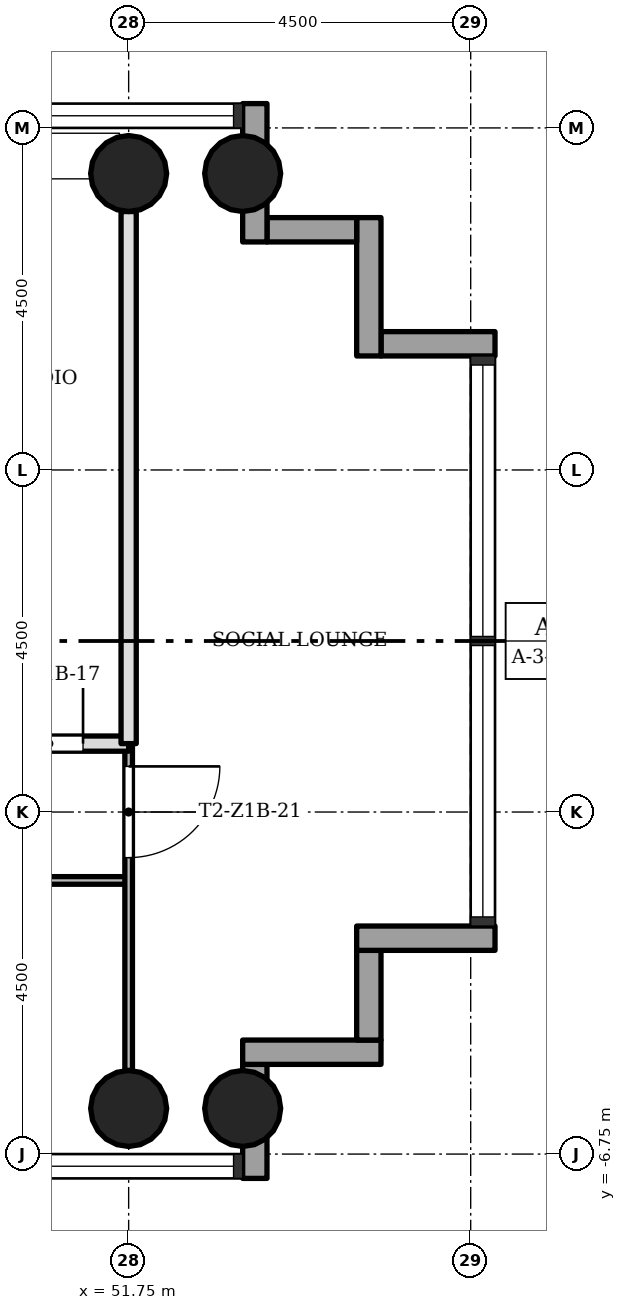
"""IFC4 building model, lengths in metres.
Left out: names, types, materials, properties, quantities, classifications, styles, units other than length and angle.
Written with IfcOpenShell. Run it as: python <this file> out.ifc"""

import sys

from ifc_helpers import new_model, si_unit, direction, frame, frame_2d, origin, origin_2d, place, context, subcontext, project, spatial, rectangle, hollow_circle, extrude, element, fill, save


model = new_model("IFC4")
c1 = context("Model", 3, precision=1e-05, world=origin(), true_north=direction((0.0, 1.0)))
c2 = subcontext(c1, "Body", "Model", "MODEL_VIEW")
j1 = project(units=[si_unit("LENGTHUNIT", "METRE"), si_unit("PLANEANGLEUNIT", "RADIAN")], contexts=[c1])
p1 = place(None, origin())
s1 = spatial("IfcSite", under=j1, at=p1, CompositionType="ELEMENT")
p2 = place(p1, origin())
s2 = spatial("IfcBuilding", under=s1, at=p2, CompositionType="ELEMENT")
p3 = place(p2, frame((0.0, 0.0, 34.7)))
s3 = spatial("IfcBuildingStorey", under=s2, at=p3, CompositionType="ELEMENT", Elevation=34.7)
for number, where, z_axis, x_axis in (
    (1, (51.75, -6.15, 0.0), (0.0, 0.0, 1.0), (1.0, 0.0, 0.0)),
    (2, (51.75, 6.15, 0.0), (0.0, 0.0, 1.0), (1.0, 0.0, 0.0)),
    (3, (53.25, -6.15, 0.0), (0.0, 0.0, 1.0), (1.0, 0.0, 0.0)),
    (4, (53.25, 6.15, 0.0), (0.0, 0.0, 1.0), (1.0, 0.0, 0.0)),
):
    element("IfcColumn", number, at=place(p3, frame(where, z_axis=z_axis, x_axis=x_axis)), inside=s3, PredefinedType="COLUMN", context=c2, shape_type="SweptSolid", body=[
        extrude(hollow_circle(Radius=0.5, WallThickness=0.036, at=origin_2d()), origin(), (0.0, 0.0, 1.0), 3.4),
    ])
p4 = place(p3, frame((53.41, -7.07, -0.3), z_axis=(0.0, 0.0, 1.0), x_axis=(0.0, 1.0, 0.0)))
e5 = element("IfcWall", 5, at=p4, inside=s3, PredefinedType="STANDARD", context=c2, shape_type="SweptSolid", body=[
    extrude(rectangle(XDim=1.5, YDim=0.32, at=frame_2d((0.75, 0.0))), origin(), (0.0, 0.0, 1.0), 3.4),
])
p5 = place(p3, frame((53.25, -5.41, -0.3), z_axis=(0.0, 0.0, 1.0), x_axis=(1.0, 0.0, 0.0)))
e6 = element("IfcWall", 6, at=p5, inside=s3, PredefinedType="STANDARD", context=c2, shape_type="SweptSolid", body=[
    extrude(rectangle(XDim=1.82, YDim=0.32, at=frame_2d((0.91, 0.0))), origin(), (0.0, 0.0, 1.0), 3.4),
])
p6 = place(p3, frame((54.91, -5.25, -0.3), z_axis=(0.0, 0.0, 1.0), x_axis=(0.0, 1.0, 0.0)))
e7 = element("IfcWall", 7, at=p6, inside=s3, PredefinedType="STANDARD", context=c2, shape_type="SweptSolid", body=[
    extrude(rectangle(XDim=1.18, YDim=0.32, at=frame_2d((0.59, 0.0))), origin(), (0.0, 0.0, 1.0), 3.4),
])
p7 = place(p3, frame((54.75, -3.91, -0.3), z_axis=(0.0, 0.0, 1.0), x_axis=(1.0, 0.0, 0.0)))
e8 = element("IfcWall", 8, at=p7, inside=s3, PredefinedType="STANDARD", context=c2, shape_type="SweptSolid", body=[
    extrude(rectangle(XDim=1.82, YDim=0.32, at=frame_2d((0.91, 0.0))), origin(), (0.0, 0.0, 1.0), 3.4),
])
p8 = place(p3, frame((56.57, 3.91, -0.3), z_axis=(0.0, 0.0, 1.0), x_axis=(-1.0, 0.0, 0.0)))
e9 = element("IfcWall", 9, at=p8, inside=s3, PredefinedType="STANDARD", context=c2, shape_type="SweptSolid", body=[
    extrude(rectangle(XDim=1.5, YDim=0.32, at=frame_2d((0.75, 0.0))), origin(), (0.0, 0.0, 1.0), 3.4),
])
p9 = place(p3, frame((54.91, 3.75, -0.3), z_axis=(0.0, 0.0, 1.0), x_axis=(0.0, 1.0, 0.0)))
e10 = element("IfcWall", 10, at=p9, inside=s3, PredefinedType="STANDARD", context=c2, shape_type="SweptSolid", body=[
    extrude(rectangle(XDim=1.82, YDim=0.32, at=frame_2d((0.91, 0.0))), origin(), (0.0, 0.0, 1.0), 3.4),
])
p10 = place(p3, frame((54.75, 5.41, -0.3), z_axis=(0.0, 0.0, 1.0), x_axis=(-1.0, 0.0, 0.0)))
e11 = element("IfcWall", 11, at=p10, inside=s3, PredefinedType="STANDARD", context=c2, shape_type="SweptSolid", body=[
    extrude(rectangle(XDim=1.18, YDim=0.32, at=frame_2d((0.59, 0.0))), origin(), (0.0, 0.0, 1.0), 3.4),
])
p11 = place(p3, frame((53.41, 5.25, -0.3), z_axis=(0.0, 0.0, 1.0), x_axis=(0.0, 1.0, 0.0)))
e12 = element("IfcWall", 12, at=p11, inside=s3, PredefinedType="STANDARD", context=c2, shape_type="SweptSolid", body=[
    extrude(rectangle(XDim=1.82, YDim=0.32, at=frame_2d((0.91, 0.0))), origin(), (0.0, 0.0, 1.0), 3.4),
])
p12 = place(p3, frame((51.75, -3.15, 0.0), z_axis=(0.0, 0.0, 1.0), x_axis=(-1.0, 0.0, 0.0)))
e13 = element("IfcWall", 13, at=p12, inside=s3, PredefinedType="PARTITIONING", context=c2, shape_type="SweptSolid", body=[
    extrude(rectangle(XDim=9.0, YDim=0.1, at=frame_2d((4.5, 0.0))), origin(), (0.0, 0.0, 1.0), 3.0),
])
p13 = place(p12, frame((6.3, 0.0, 0.0)))
e14 = element("IfcOpeningElement", 14, at=p13, cuts=e13, PredefinedType="OPENING", context=c2, shape_type="SweptSolid", body=[
    extrude(rectangle(XDim=0.9, YDim=2.1, at=frame_2d((0.45, 1.05))), frame((0.0, 0.06, 0.0), z_axis=(0.0, -1.0, 0.0), x_axis=(1.0, 0.0, 0.0)), (0.0, 0.0, 1.0), 0.12),
])
p14 = place(p12, frame((1.8, 0.0, 0.0)))
e15 = element("IfcOpeningElement", 15, at=p14, cuts=e13, PredefinedType="OPENING", context=c2, shape_type="SweptSolid", body=[
    extrude(rectangle(XDim=0.9, YDim=2.1, at=frame_2d((0.45, 1.05))), frame((0.0, 0.06, 0.0), z_axis=(0.0, -1.0, 0.0), x_axis=(1.0, 0.0, 0.0)), (0.0, 0.0, 1.0), 0.12),
])
p15 = place(p3, frame((51.75, -1.35, 0.0), z_axis=(0.0, 0.0, 1.0), x_axis=(-1.0, 0.0, 0.0)))
e16 = element("IfcWall", 16, at=p15, inside=s3, PredefinedType="SOLIDWALL", context=c2, shape_type="SweptSolid", body=[
    extrude(rectangle(XDim=4.5, YDim=0.2, at=frame_2d((2.25, 0.0))), origin(), (0.0, 0.0, 1.0), 3.0),
])
p16 = place(p15, frame((0.6, 0.0, 0.0)))
e17 = element("IfcOpeningElement", 17, at=p16, cuts=e16, PredefinedType="OPENING", context=c2, shape_type="SweptSolid", body=[
    extrude(rectangle(XDim=0.9, YDim=2.1, at=frame_2d((0.45, 1.05))), frame((0.0, 0.11, 0.0), z_axis=(0.0, -1.0, 0.0), x_axis=(1.0, 0.0, 0.0)), (0.0, 0.0, 1.0), 0.22),
])
p17 = place(p3, frame((51.75, -5.65, 0.0), z_axis=(0.0, 0.0, 1.0), x_axis=(0.0, 1.0, 0.0)))
e18 = element("IfcWall", 18, at=p17, inside=s3, PredefinedType="PARTITIONING", context=c2, shape_type="SweptSolid", body=[
    extrude(rectangle(XDim=4.3, YDim=0.1, at=frame_2d((2.15, 0.0))), origin(), (0.0, 0.0, 1.0), 3.0),
])
p18 = place(p17, frame((2.8, 0.0, 0.0)))
e19 = element("IfcOpeningElement", 19, at=p18, cuts=e18, PredefinedType="OPENING", context=c2, shape_type="SweptSolid", body=[
    extrude(rectangle(XDim=1.2, YDim=2.1, at=frame_2d((0.6, 1.05))), frame((0.0, 0.06, 0.0), z_axis=(0.0, -1.0, 0.0), x_axis=(1.0, 0.0, 0.0)), (0.0, 0.0, 1.0), 0.12),
])
p19 = place(p3, frame((51.75, -1.35, 0.0), z_axis=(0.0, 0.0, 1.0), x_axis=(0.0, 1.0, 0.0)))
e20 = element("IfcWall", 20, at=p19, inside=s3, PredefinedType="SOLIDWALL", context=c2, shape_type="SweptSolid", body=[
    extrude(rectangle(XDim=7.0, YDim=0.2, at=frame_2d((3.5, 0.0))), origin(), (0.0, 0.0, 1.0), 3.0),
])
p20 = place(p16, origin())
e21 = element("IfcDoor", 21, at=p20, inside=s3, OperationType="SINGLE_SWING_LEFT", PredefinedType="DOOR", context=c2, shape_type="SweptSolid", body=[
    extrude(rectangle(XDim=0.9, YDim=2.1, at=frame_2d((0.45, 1.05))), frame((0.0, 0.025, 0.0), z_axis=(0.0, -1.0, 0.0), x_axis=(1.0, 0.0, 0.0)), (0.0, 0.0, 1.0), 0.05),
])
fill(e17, e21)
p21 = place(p18, origin())
e22 = element("IfcDoor", 22, at=p21, inside=s3, OperationType="SINGLE_SWING_RIGHT", PredefinedType="DOOR", context=c2, shape_type="SweptSolid", body=[
    extrude(rectangle(XDim=1.2, YDim=2.1, at=frame_2d((0.6, 1.05))), frame((0.0, 0.025, 0.0), z_axis=(0.0, -1.0, 0.0), x_axis=(1.0, 0.0, 0.0)), (0.0, 0.0, 1.0), 0.05),
])
fill(e19, e22)
save(model, sys.argv[1])
